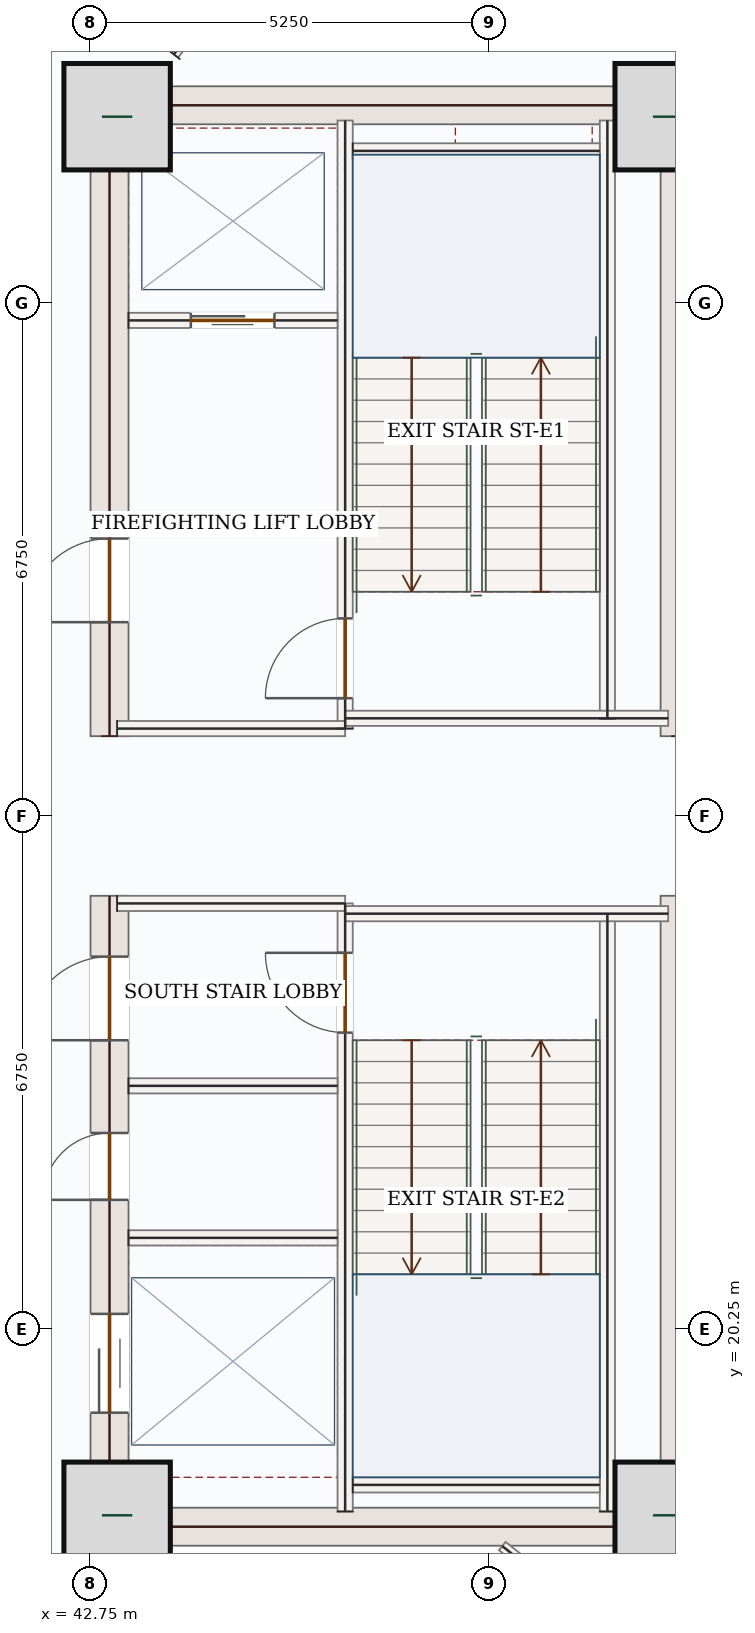
"""IFC4 building model, lengths in metres.
Left out: names, types, materials, properties, quantities, classifications, styles, units other than length and angle.
Written with IfcOpenShell. Run it as: python <this file> out.ifc"""

import sys

from ifc_helpers import new_model, si_unit, direction, frame, frame_2d, origin, origin_2d, place, context, subcontext, project, spatial, rectangle, extrude, source, transform, mapped, element, fill, save


model = new_model("IFC4")
c1 = context("Model", 3, precision=1e-05, world=origin(), true_north=direction((0.0, 1.0)))
c2 = subcontext(c1, "Body", "Model", "MODEL_VIEW")
j1 = project(units=[si_unit("LENGTHUNIT", "METRE"), si_unit("PLANEANGLEUNIT", "RADIAN")], contexts=[c1])
p1 = place(None, origin())
s1 = spatial("IfcSite", under=j1, at=p1, CompositionType="ELEMENT")
p2 = place(p1, origin())
s2 = spatial("IfcBuilding", under=s1, at=p2, CompositionType="ELEMENT")
p3 = place(p2, frame((0.0, 0.0, 108.9)))
s3 = spatial("IfcBuildingStorey", under=s2, at=p3, CompositionType="ELEMENT", Elevation=108.9)
p4 = place(p3, frame((43.0, 17.4, 0.0), z_axis=(0.0, 0.0, 1.0), x_axis=(0.0, 1.0, 0.0)))
e1 = element("IfcWall", 1, at=p4, inside=s3, PredefinedType="SHEAR", context=c2, shape_type="SweptSolid", body=[
    extrude(rectangle(XDim=8.55, YDim=0.5, at=frame_2d((4.275, 0.0))), origin(), (0.0, 0.0, 1.0), 3.95),
])
p5 = place(p4, frame((6.65, 0.0, 0.0)))
e2 = element("IfcOpeningElement", 2, at=p5, cuts=e1, PredefinedType="OPENING", context=c2, shape_type="SweptSolid", body=[
    extrude(rectangle(XDim=1.1, YDim=2.2, at=frame_2d((0.55, 1.1))), frame((0.0, 0.26, 0.0), z_axis=(0.0, -1.0, 0.0), x_axis=(1.0, 0.0, 0.0)), (0.0, 0.0, 1.0), 0.52),
])
p6 = place(p4, frame((1.75, 0.0, 0.0)))
e3 = element("IfcOpeningElement", 3, at=p6, cuts=e1, PredefinedType="OPENING", context=c2, shape_type="SweptSolid", body=[
    extrude(rectangle(XDim=1.3, YDim=2.2, at=frame_2d((0.65, 1.1))), frame((0.0, 0.26, 0.0), z_axis=(0.0, -1.0, 0.0), x_axis=(1.0, 0.0, 0.0)), (0.0, 0.0, 1.0), 0.52),
])
p7 = place(p4, frame((4.55, 0.0, 0.0)))
e4 = element("IfcOpeningElement", 4, at=p7, cuts=e1, PredefinedType="OPENING", context=c2, shape_type="SweptSolid", body=[
    extrude(rectangle(XDim=0.88, YDim=2.1, at=frame_2d((0.44, 1.05))), frame((0.0, 0.26, 0.0), z_axis=(0.0, -1.0, 0.0), x_axis=(1.0, 0.0, 0.0)), (0.0, 0.0, 1.0), 0.52),
])
p8 = place(p3, frame((43.0, 28.05, 0.0), z_axis=(0.0, 0.0, 1.0), x_axis=(0.0, 1.0, 0.0)))
e5 = element("IfcWall", 5, at=p8, inside=s3, PredefinedType="SHEAR", context=c2, shape_type="SweptSolid", body=[
    extrude(rectangle(XDim=8.55, YDim=0.5, at=frame_2d((4.275, 0.0))), origin(), (0.0, 0.0, 1.0), 3.95),
])
p9 = place(p8, frame((1.5, 0.0, 0.0)))
e6 = element("IfcOpeningElement", 6, at=p9, cuts=e5, PredefinedType="OPENING", context=c2, shape_type="SweptSolid", body=[
    extrude(rectangle(XDim=1.1, YDim=2.2, at=frame_2d((0.55, 1.1))), frame((0.0, 0.26, 0.0), z_axis=(0.0, -1.0, 0.0), x_axis=(1.0, 0.0, 0.0)), (0.0, 0.0, 1.0), 0.52),
])
m1 = source(origin(), c2, "Body", "SweptSolid", [
    extrude(rectangle(XDim=8.55, YDim=0.5, at=frame_2d((4.275, 0.0))), origin(), (0.0, 0.0, 1.0), 3.95),
])
for number, where, z_axis, x_axis in (
    (7, (50.5, 17.4, 0.0), (0.0, 0.0, 1.0), (0.0, 1.0, 0.0)),
    (8, (50.5, 28.05, 0.0), (0.0, 0.0, 1.0), (0.0, 1.0, 0.0)),
):
    element("IfcWall", number, at=place(p3, frame(where, z_axis=z_axis, x_axis=x_axis)), inside=s3, PredefinedType="SHEAR", context=c2, shape_type="MappedRepresentation", body=[
        mapped(m1, transform((0.0, 0.0, 0.0), x_axis=(1.0, 0.0, 0.0), y_axis=(0.0, 1.0, 0.0), z_axis=(0.0, 0.0, 1.0), scale=1.0)),
    ])
m2 = source(origin(), c2, "Body", "SweptSolid", [
    extrude(rectangle(XDim=7.0, YDim=0.5, at=frame_2d((3.5, 0.0))), origin(), (0.0, 0.0, 1.0), 3.95),
])
for number, where, z_axis, x_axis in (
    (9, (43.25, 17.65, 0.0), (0.0, 0.0, 1.0), (1.0, 0.0, 0.0)),
    (10, (43.25, 36.35, 0.0), (0.0, 0.0, 1.0), (1.0, 0.0, 0.0)),
):
    element("IfcWall", number, at=place(p3, frame(where, z_axis=z_axis, x_axis=x_axis)), inside=s3, PredefinedType="SHEAR", context=c2, shape_type="MappedRepresentation", body=[
        mapped(m2, transform((0.0, 0.0, 0.0), x_axis=(1.0, 0.0, 0.0), y_axis=(0.0, 1.0, 0.0), z_axis=(0.0, 0.0, 1.0), scale=1.0)),
    ])
m3 = source(origin(), c2, "Body", "SweptSolid", [
    extrude(rectangle(XDim=1.4, YDim=1.4, at=origin_2d()), origin(), (0.0, 0.0, 1.0), 4.2),
])
for number, where, z_axis, x_axis in (
    (11, (43.1, 17.8, 0.0), (0.0, 0.0, 1.0), (1.0, 0.0, 0.0)),
    (12, (50.35, 17.8, 0.0), (0.0, 0.0, 1.0), (1.0, 0.0, 0.0)),
    (13, (43.1, 36.2, 0.0), (0.0, 0.0, 1.0), (1.0, 0.0, 0.0)),
    (14, (50.35, 36.2, 0.0), (0.0, 0.0, 1.0), (1.0, 0.0, 0.0)),
):
    element("IfcColumn", number, at=place(p3, frame(where, z_axis=z_axis, x_axis=x_axis)), inside=s3, PredefinedType="COLUMN", context=c2, shape_type="MappedRepresentation", body=[
        mapped(m3, transform((0.0, 0.0, 0.0), x_axis=(1.0, 0.0, 0.0), y_axis=(0.0, 1.0, 0.0), z_axis=(0.0, 0.0, 1.0), scale=1.0)),
    ])
p10 = place(p3, frame((53.06, 18.458, 0.0), z_axis=(0.0, 0.0, 1.0), x_axis=(-0.707106781187, -0.707106781187, 0.0)))
e15 = element("IfcWall", 15, at=p10, inside=s3, PredefinedType="SOLIDWALL", context=c2, shape_type="SweptSolid", body=[
    extrude(rectangle(XDim=5.258, YDim=0.32, at=frame_2d((2.629, 0.0))), origin(), (0.0, 0.0, 1.0), 3.95),
])
p11 = place(p10, frame((1.429, 0.0, 0.85)))
e16 = element("IfcOpeningElement", 16, at=p11, cuts=e15, PredefinedType="OPENING", context=c2, shape_type="SweptSolid", body=[
    extrude(rectangle(XDim=2.4, YDim=1.8, at=frame_2d((1.2, 0.9))), frame((0.0, 0.17, 0.0), z_axis=(0.0, -1.0, 0.0), x_axis=(1.0, 0.0, 0.0)), (0.0, 0.0, 1.0), 0.34),
])
m4 = source(origin(), c2, "Body", "SweptSolid", [
    extrude(rectangle(XDim=4.99, YDim=0.32, at=frame_2d((2.495, 0.0))), origin(), (0.0, 0.0, 1.0), 3.95),
])
p12 = place(p3, frame((49.342, 39.26, 0.0), z_axis=(0.0, 0.0, 1.0), x_axis=(0.707106781187, -0.707106781187, 0.0)))
e17 = element("IfcWall", 17, at=p12, inside=s3, PredefinedType="SOLIDWALL", context=c2, shape_type="MappedRepresentation", body=[
    mapped(m4, transform((0.0, 0.0, 0.0), x_axis=(1.0, 0.0, 0.0), y_axis=(0.0, 1.0, 0.0), z_axis=(0.0, 0.0, 1.0), scale=1.0)),
])
m5 = source(origin(), c2, "Body", "SweptSolid", [
    extrude(rectangle(XDim=7.87, YDim=0.2, at=frame_2d((3.935, 0.0))), origin(), (0.0, 0.0, 1.0), 3.95),
])
for number, where, z_axis, x_axis in (
    (18, (49.55, 17.85, 0.0), (0.0, 0.0, 1.0), (0.0, 1.0, 0.0)),
    (19, (49.55, 28.28, 0.0), (0.0, 0.0, 1.0), (0.0, 1.0, 0.0)),
):
    element("IfcWall", number, at=place(p3, frame(where, z_axis=z_axis, x_axis=x_axis)), inside=s3, PredefinedType="SOLIDWALL", context=c2, shape_type="MappedRepresentation", body=[
        mapped(m5, transform((0.0, 0.0, 0.0), x_axis=(1.0, 0.0, 0.0), y_axis=(0.0, 1.0, 0.0), z_axis=(0.0, 0.0, 1.0), scale=1.0)),
    ])
p13 = place(p3, frame((46.1, 17.85, 0.0), z_axis=(0.0, 0.0, 1.0), x_axis=(0.0, 1.0, 0.0)))
e20 = element("IfcWall", 20, at=p13, inside=s3, PredefinedType="SOLIDWALL", context=c2, shape_type="SweptSolid", body=[
    extrude(rectangle(XDim=8.0, YDim=0.2, at=frame_2d((4.0, 0.0))), origin(), (0.0, 0.0, 1.0), 3.95),
])
p14 = place(p13, frame((6.3, 0.0, 0.0)))
e21 = element("IfcOpeningElement", 21, at=p14, cuts=e20, PredefinedType="OPENING", context=c2, shape_type="SweptSolid", body=[
    extrude(rectangle(XDim=1.05, YDim=2.15, at=frame_2d((0.525, 1.075))), frame((0.0, 0.11, 0.0), z_axis=(0.0, -1.0, 0.0), x_axis=(1.0, 0.0, 0.0)), (0.0, 0.0, 1.0), 0.22),
])
p15 = place(p3, frame((46.1, 28.15, 0.0), z_axis=(0.0, 0.0, 1.0), x_axis=(0.0, 1.0, 0.0)))
e22 = element("IfcWall", 22, at=p15, inside=s3, PredefinedType="SOLIDWALL", context=c2, shape_type="SweptSolid", body=[
    extrude(rectangle(XDim=8.0, YDim=0.2, at=frame_2d((4.0, 0.0))), origin(), (0.0, 0.0, 1.0), 3.95),
])
p16 = place(p15, frame((0.4, 0.0, 0.0)))
e23 = element("IfcOpeningElement", 23, at=p16, cuts=e22, PredefinedType="OPENING", context=c2, shape_type="SweptSolid", body=[
    extrude(rectangle(XDim=1.05, YDim=2.15, at=frame_2d((0.525, 1.075))), frame((0.0, 0.11, 0.0), z_axis=(0.0, -1.0, 0.0), x_axis=(1.0, 0.0, 0.0)), (0.0, 0.0, 1.0), 0.22),
])
m6 = source(origin(), c2, "Body", "SweptSolid", [
    extrude(rectangle(XDim=3.0, YDim=0.2, at=frame_2d((1.5, 0.0))), origin(), (0.0, 0.0, 1.0), 3.95),
])
p17 = place(p3, frame((43.1, 25.85, 0.0), z_axis=(0.0, 0.0, 1.0), x_axis=(1.0, 0.0, 0.0)))
e24 = element("IfcWall", 24, at=p17, inside=s3, PredefinedType="SOLIDWALL", context=c2, shape_type="MappedRepresentation", body=[
    mapped(m6, transform((0.0, 0.0, 0.0), x_axis=(1.0, 0.0, 0.0), y_axis=(0.0, 1.0, 0.0), z_axis=(0.0, 0.0, 1.0), scale=1.0)),
])
m7 = source(origin(), c2, "Body", "SweptSolid", [
    extrude(rectangle(XDim=4.25, YDim=0.2, at=frame_2d((2.125, 0.0))), origin(), (0.0, 0.0, 1.0), 3.95),
])
p18 = place(p3, frame((46.1, 25.715, 0.0), z_axis=(0.0, 0.0, 1.0), x_axis=(1.0, 0.0, 0.0)))
e25 = element("IfcWall", 25, at=p18, inside=s3, PredefinedType="SOLIDWALL", context=c2, shape_type="MappedRepresentation", body=[
    mapped(m7, transform((0.0, 0.0, 0.0), x_axis=(1.0, 0.0, 0.0), y_axis=(0.0, 1.0, 0.0), z_axis=(0.0, 0.0, 1.0), scale=1.0)),
])
p19 = place(p3, frame((43.1, 28.15, 0.0), z_axis=(0.0, 0.0, 1.0), x_axis=(1.0, 0.0, 0.0)))
e26 = element("IfcWall", 26, at=p19, inside=s3, PredefinedType="SOLIDWALL", context=c2, shape_type="MappedRepresentation", body=[
    mapped(m6, transform((0.0, 0.0, 0.0), x_axis=(1.0, 0.0, 0.0), y_axis=(0.0, 1.0, 0.0), z_axis=(0.0, 0.0, 1.0), scale=1.0)),
])
p20 = place(p3, frame((46.1, 28.285, 0.0), z_axis=(0.0, 0.0, 1.0), x_axis=(1.0, 0.0, 0.0)))
e27 = element("IfcWall", 27, at=p20, inside=s3, PredefinedType="SOLIDWALL", context=c2, shape_type="MappedRepresentation", body=[
    mapped(m7, transform((0.0, 0.0, 0.0), x_axis=(1.0, 0.0, 0.0), y_axis=(0.0, 1.0, 0.0), z_axis=(0.0, 0.0, 1.0), scale=1.0)),
])
m8 = source(origin(), c2, "Body", "SweptSolid", [
    extrude(rectangle(XDim=3.25, YDim=0.2, at=frame_2d((1.625, 0.0))), origin(), (0.0, 0.0, 1.0), 3.95),
])
for number, where, z_axis, x_axis in (
    (28, (46.2, 35.75, 0.0), (0.0, 0.0, 1.0), (1.0, 0.0, 0.0)),
    (29, (46.2, 18.2, 0.0), (0.0, 0.0, 1.0), (1.0, 0.0, 0.0)),
):
    element("IfcWall", number, at=place(p3, frame(where, z_axis=z_axis, x_axis=x_axis)), inside=s3, PredefinedType="SOLIDWALL", context=c2, shape_type="MappedRepresentation", body=[
        mapped(m8, transform((0.0, 0.0, 0.0), x_axis=(1.0, 0.0, 0.0), y_axis=(0.0, 1.0, 0.0), z_axis=(0.0, 0.0, 1.0), scale=1.0)),
    ])
p21 = place(p3, frame((43.25, 33.52, 0.0), z_axis=(0.0, 0.0, 1.0), x_axis=(1.0, 0.0, 0.0)))
e30 = element("IfcWall", 30, at=p21, inside=s3, PredefinedType="SOLIDWALL", context=c2, shape_type="SweptSolid", body=[
    extrude(rectangle(XDim=2.75, YDim=0.2, at=frame_2d((1.375, 0.0))), origin(), (0.0, 0.0, 1.0), 3.95),
])
p22 = place(p21, frame((0.82, 0.0, 0.0)))
e31 = element("IfcOpeningElement", 31, at=p22, cuts=e30, PredefinedType="OPENING", context=c2, shape_type="SweptSolid", body=[
    extrude(rectangle(XDim=1.1, YDim=2.15, at=frame_2d((0.55, 1.075))), frame((0.0, 0.11, 0.0), z_axis=(0.0, -1.0, 0.0), x_axis=(1.0, 0.0, 0.0)), (0.0, 0.0, 1.0), 0.22),
])
m9 = source(origin(), c2, "Body", "SweptSolid", [
    extrude(rectangle(XDim=2.75, YDim=0.2, at=frame_2d((1.375, 0.0))), origin(), (0.0, 0.0, 1.0), 3.95),
])
for number, where, z_axis, x_axis in (
    (32, (43.25, 23.45, 0.0), (0.0, 0.0, 1.0), (1.0, 0.0, 0.0)),
    (33, (43.25, 21.45, 0.0), (0.0, 0.0, 1.0), (1.0, 0.0, 0.0)),
):
    element("IfcWall", number, at=place(p3, frame(where, z_axis=z_axis, x_axis=x_axis)), inside=s3, PredefinedType="SOLIDWALL", context=c2, shape_type="MappedRepresentation", body=[
        mapped(m9, transform((0.0, 0.0, 0.0), x_axis=(1.0, 0.0, 0.0), y_axis=(0.0, 1.0, 0.0), z_axis=(0.0, 0.0, 1.0), scale=1.0)),
    ])
m10 = source(origin(), c2, "Body", "SweptSolid", [
    extrude(rectangle(XDim=2.56, YDim=0.14, at=frame_2d((1.28, 0.0))), origin(), (0.0, 0.0, 1.0), 3.95),
])
p23 = place(p3, frame((50.173, 15.804, 0.0), z_axis=(0.0, 0.0, 1.0), x_axis=(-0.783347138409, 0.621584475954, 0.0)))
e34 = element("IfcWall", 34, at=p23, inside=s3, PredefinedType="PARTITIONING", context=c2, shape_type="MappedRepresentation", body=[
    mapped(m10, transform((0.0, 0.0, 0.0), x_axis=(1.0, 0.0, 0.0), y_axis=(0.0, 1.0, 0.0), z_axis=(0.0, 0.0, 1.0), scale=1.0)),
])
m11 = source(origin(), c2, "Body", "SweptSolid", [
    extrude(rectangle(XDim=2.629, YDim=0.14, at=frame_2d((1.315, 0.0))), origin(), (0.0, 0.0, 1.0), 3.95),
])
p24 = place(p3, frame((43.846, 37.02, 0.0), z_axis=(0.0, 0.0, 1.0), x_axis=(0.614210560268, 0.789142184689, 0.0)))
e35 = element("IfcWall", 35, at=p24, inside=s3, PredefinedType="PARTITIONING", context=c2, shape_type="MappedRepresentation", body=[
    mapped(m11, transform((0.0, 0.0, 0.0), x_axis=(1.0, 0.0, 0.0), y_axis=(0.0, 1.0, 0.0), z_axis=(0.0, 0.0, 1.0), scale=1.0)),
])
m12 = source(origin(), c2, "Body", "SweptSolid", [
    extrude(rectangle(XDim=2.4, YDim=1.8, at=frame_2d((1.2, 0.9))), frame((0.0, 0.03, 0.0), z_axis=(0.0, -1.0, 0.0), x_axis=(1.0, 0.0, 0.0)), (0.0, 0.0, 1.0), 0.06),
])
p25 = place(p11, origin())
e36 = element("IfcWindow", 36, at=p25, inside=s3, PartitioningType="DOUBLE_PANEL_VERTICAL", PredefinedType="WINDOW", context=c2, shape_type="MappedRepresentation", body=[
    mapped(m12, transform((0.0, 0.0, 0.0), x_axis=(1.0, 0.0, 0.0), y_axis=(0.0, 1.0, 0.0), z_axis=(0.0, 0.0, 1.0), scale=1.0)),
])
fill(e16, e36)
m13 = source(origin(), c2, "Body", "SweptSolid", [
    extrude(rectangle(XDim=1.05, YDim=2.15, at=frame_2d((0.525, 1.075))), frame((0.0, 0.025, 0.0), z_axis=(0.0, -1.0, 0.0), x_axis=(1.0, 0.0, 0.0)), (0.0, 0.0, 1.0), 0.05),
])
p26 = place(p16, origin())
e37 = element("IfcDoor", 37, at=p26, inside=s3, OperationType="SINGLE_SWING_LEFT", PredefinedType="DOOR", context=c2, shape_type="MappedRepresentation", body=[
    mapped(m13, transform((0.0, 0.0, 0.0), x_axis=(1.0, 0.0, 0.0), y_axis=(0.0, 1.0, 0.0), z_axis=(0.0, 0.0, 1.0), scale=1.0)),
])
fill(e23, e37)
p27 = place(p14, origin())
e38 = element("IfcDoor", 38, at=p27, inside=s3, OperationType="SINGLE_SWING_RIGHT", PredefinedType="DOOR", context=c2, shape_type="MappedRepresentation", body=[
    mapped(m13, transform((0.0, 0.0, 0.0), x_axis=(1.0, 0.0, 0.0), y_axis=(0.0, 1.0, 0.0), z_axis=(0.0, 0.0, 1.0), scale=1.0)),
])
fill(e21, e38)
m14 = source(origin(), c2, "Body", "SweptSolid", [
    extrude(rectangle(XDim=1.1, YDim=2.15, at=frame_2d((0.55, 1.075))), frame((0.0, 0.025, 0.0), z_axis=(0.0, -1.0, 0.0), x_axis=(1.0, 0.0, 0.0)), (0.0, 0.0, 1.0), 0.05),
])
p28 = place(p22, origin())
e39 = element("IfcDoor", 39, at=p28, inside=s3, OperationType="DOUBLE_DOOR_SLIDING", PredefinedType="DOOR", context=c2, shape_type="MappedRepresentation", body=[
    mapped(m14, transform((0.0, 0.0, 0.0), x_axis=(1.0, 0.0, 0.0), y_axis=(0.0, 1.0, 0.0), z_axis=(0.0, 0.0, 1.0), scale=1.0)),
])
fill(e31, e39)
m15 = source(origin(), c2, "Body", "SweptSolid", [
    extrude(rectangle(XDim=1.1, YDim=2.2, at=frame_2d((0.55, 1.1))), frame((0.0, 0.025, 0.0), z_axis=(0.0, -1.0, 0.0), x_axis=(1.0, 0.0, 0.0)), (0.0, 0.0, 1.0), 0.05),
])
p29 = place(p9, origin())
e40 = element("IfcDoor", 40, at=p29, inside=s3, OperationType="SINGLE_SWING_LEFT", PredefinedType="DOOR", context=c2, shape_type="MappedRepresentation", body=[
    mapped(m15, transform((0.0, 0.0, 0.0), x_axis=(1.0, 0.0, 0.0), y_axis=(0.0, 1.0, 0.0), z_axis=(0.0, 0.0, 1.0), scale=1.0)),
])
fill(e6, e40)
p30 = place(p5, origin())
e41 = element("IfcDoor", 41, at=p30, inside=s3, OperationType="SINGLE_SWING_LEFT", PredefinedType="DOOR", context=c2, shape_type="MappedRepresentation", body=[
    mapped(m15, transform((0.0, 0.0, 0.0), x_axis=(1.0, 0.0, 0.0), y_axis=(0.0, 1.0, 0.0), z_axis=(0.0, 0.0, 1.0), scale=1.0)),
])
fill(e2, e41)
m16 = source(origin(), c2, "Body", "SweptSolid", [
    extrude(rectangle(XDim=1.3, YDim=2.2, at=frame_2d((0.65, 1.1))), frame((0.0, 0.025, 0.0), z_axis=(0.0, -1.0, 0.0), x_axis=(1.0, 0.0, 0.0)), (0.0, 0.0, 1.0), 0.05),
])
p31 = place(p6, origin())
e42 = element("IfcDoor", 42, at=p31, inside=s3, OperationType="DOUBLE_DOOR_SLIDING", PredefinedType="DOOR", context=c2, shape_type="MappedRepresentation", body=[
    mapped(m16, transform((0.0, 0.0, 0.0), x_axis=(1.0, 0.0, 0.0), y_axis=(0.0, 1.0, 0.0), z_axis=(0.0, 0.0, 1.0), scale=1.0)),
])
fill(e3, e42)
m17 = source(origin(), c2, "Body", "SweptSolid", [
    extrude(rectangle(XDim=0.88, YDim=2.1, at=frame_2d((0.44, 1.05))), frame((0.0, 0.025, 0.0), z_axis=(0.0, -1.0, 0.0), x_axis=(1.0, 0.0, 0.0)), (0.0, 0.0, 1.0), 0.05),
])
p32 = place(p7, origin())
e43 = element("IfcDoor", 43, at=p32, inside=s3, OperationType="SINGLE_SWING_LEFT", PredefinedType="DOOR", context=c2, shape_type="MappedRepresentation", body=[
    mapped(m17, transform((0.0, 0.0, 0.0), x_axis=(1.0, 0.0, 0.0), y_axis=(0.0, 1.0, 0.0), z_axis=(0.0, 0.0, 1.0), scale=1.0)),
])
fill(e4, e43)
save(model, sys.argv[1])
